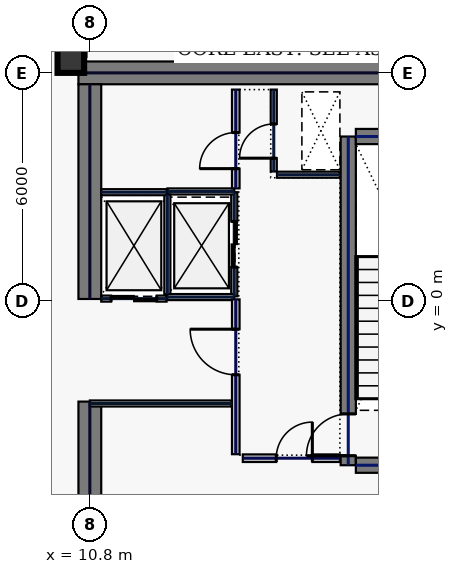
"""IFC4 building model, lengths in metres.
Left out: names, types, materials, properties, quantities, classifications, styles, units other than length and angle.
Written with IfcOpenShell. Run it as: python <this file> out.ifc"""

import sys

from ifc_helpers import new_model, si_unit, direction, frame, frame_2d, origin, origin_2d, place, context, subcontext, project, spatial, rectangle, hollow_rectangle, extrude, element, fill, save


model = new_model("IFC4")
c1 = context("Model", 3, precision=1e-05, world=origin(), true_north=direction((0.0, 1.0)))
c2 = subcontext(c1, "Body", "Model", "MODEL_VIEW")
j1 = project(units=[si_unit("LENGTHUNIT", "METRE"), si_unit("PLANEANGLEUNIT", "RADIAN")], contexts=[c1])
p1 = place(None, origin())
s1 = spatial("IfcSite", under=j1, at=p1, CompositionType="ELEMENT")
p2 = place(p1, origin())
s2 = spatial("IfcBuilding", under=s1, at=p2, CompositionType="ELEMENT")
p3 = place(p2, frame((0.0, 0.0, 321.0)))
s3 = spatial("IfcBuildingStorey", under=s2, at=p3, CompositionType="ELEMENT", Elevation=321.0)
p4 = place(p3, frame((10.5, 6.0, 0.0), z_axis=(0.0, 0.0, 1.0), x_axis=(1.0, 0.0, 0.0)))
e1 = element("IfcWall", 1, at=p4, inside=s3, PredefinedType="SHEAR", context=c2, shape_type="SweptSolid", body=[
    extrude(rectangle(XDim=11.5, YDim=0.6, at=frame_2d((5.75, 0.0))), origin(), (0.0, 0.0, 1.0), 3.74),
])
p5 = place(p3, frame((10.8, -5.7, 0.0), z_axis=(0.0, 0.0, 1.0), x_axis=(0.0, 1.0, 0.0)))
e2 = element("IfcWall", 2, at=p5, inside=s3, PredefinedType="SHEAR", context=c2, shape_type="SweptSolid", body=[
    extrude(rectangle(XDim=3.05, YDim=0.6, at=frame_2d((1.525, 0.0))), origin(), (0.0, 0.0, 1.0), 3.74),
])
p6 = place(p3, frame((10.8, 0.05, 0.0), z_axis=(0.0, 0.0, 1.0), x_axis=(0.0, 1.0, 0.0)))
e3 = element("IfcWall", 3, at=p6, inside=s3, PredefinedType="SHEAR", context=c2, shape_type="SweptSolid", body=[
    extrude(rectangle(XDim=5.65, YDim=0.6, at=frame_2d((2.825, 0.0))), origin(), (0.0, 0.0, 1.0), 3.74),
])
p7 = place(p3, frame((17.6, -4.325, 0.0), z_axis=(0.0, 0.0, 1.0), x_axis=(0.0, 1.0, 0.0)))
e4 = element("IfcWall", 4, at=p7, inside=s3, PredefinedType="SHEAR", context=c2, shape_type="SweptSolid", body=[
    extrude(rectangle(XDim=8.65, YDim=0.4, at=frame_2d((4.325, 0.0))), origin(), (0.0, 0.0, 1.0), 3.74),
])
p8 = place(p7, frame((0.25, 0.0, 0.0)))
e5 = element("IfcOpeningElement", 5, at=p8, cuts=e4, PredefinedType="OPENING", context=c2, shape_type="SweptSolid", body=[
    extrude(rectangle(XDim=1.1, YDim=2.2, at=frame_2d((0.55, 1.1))), frame((0.0, 0.21, 0.0), z_axis=(0.0, -1.0, 0.0), x_axis=(1.0, 0.0, 0.0)), (0.0, 0.0, 1.0), 0.42),
])
for number, where, z_axis, x_axis in (
    (6, (17.8, -4.325, 0.0), (0.0, 0.0, 1.0), (1.0, 0.0, 0.0)),
    (7, (17.8, 4.325, 0.0), (0.0, 0.0, 1.0), (1.0, 0.0, 0.0)),
):
    element("IfcWall", number, at=place(p3, frame(where, z_axis=z_axis, x_axis=x_axis)), inside=s3, PredefinedType="SHEAR", context=c2, shape_type="SweptSolid", body=[
        extrude(rectangle(XDim=3.4, YDim=0.4, at=frame_2d((1.7, 0.0))), origin(), (0.0, 0.0, 1.0), 3.74),
    ])
p9 = place(p3, frame((10.3, 6.35, 0.0), z_axis=(0.0, 0.0, 1.0), x_axis=(1.0, 0.0, 0.0)))
e8 = element("IfcColumn", 8, at=p9, inside=s3, PredefinedType="COLUMN", context=c2, shape_type="SweptSolid", body=[
    extrude(hollow_rectangle(XDim=0.7, YDim=0.7, WallThickness=0.032, at=origin_2d()), origin(), (0.0, 0.0, 1.0), 3.74),
])
p10 = place(p3, frame((14.6, 0.12, 0.0), z_axis=(0.0, 0.0, 1.0), x_axis=(0.0, 1.0, 0.0)))
e9 = element("IfcWall", 9, at=p10, inside=s3, PredefinedType="PARTITIONING", context=c2, shape_type="SweptSolid", body=[
    extrude(rectangle(XDim=2.74, YDim=0.16, at=frame_2d((1.37, 0.0))), origin(), (0.0, 0.0, 1.0), 3.74),
])
p11 = place(p10, frame((0.77, 0.0, 0.0)))
e10 = element("IfcOpeningElement", 10, at=p11, cuts=e9, PredefinedType="OPENING", context=c2, shape_type="SweptSolid", body=[
    extrude(rectangle(XDim=1.2, YDim=2.2, at=frame_2d((0.6, 1.1))), frame((0.0, 0.09, 0.0), z_axis=(0.0, -1.0, 0.0), x_axis=(1.0, 0.0, 0.0)), (0.0, 0.0, 1.0), 0.18),
])
for number, where, z_axis, x_axis in (
    (11, (12.84, 0.1, 0.0), (0.0, 0.0, 1.0), (1.0, 0.0, 0.0)),
    (12, (12.84, 2.88, 0.0), (0.0, 0.0, 1.0), (1.0, 0.0, 0.0)),
):
    element("IfcWall", number, at=place(p3, frame(where, z_axis=z_axis, x_axis=x_axis)), inside=s3, PredefinedType="PARTITIONING", context=c2, shape_type="SweptSolid", body=[
        extrude(rectangle(XDim=1.76, YDim=0.16, at=frame_2d((0.88, 0.0))), origin(), (0.0, 0.0, 1.0), 3.74),
    ])
p12 = place(p3, frame((12.84, 0.18, 0.0), z_axis=(0.0, 0.0, 1.0), x_axis=(0.0, 1.0, 0.0)))
e13 = element("IfcWall", 13, at=p12, inside=s3, PredefinedType="PARTITIONING", context=c2, shape_type="SweptSolid", body=[
    extrude(rectangle(XDim=2.62, YDim=0.16, at=frame_2d((1.31, 0.0))), origin(), (0.0, 0.0, 1.0), 3.74),
])
p13 = place(p3, frame((11.1, 0.06, 0.0), z_axis=(0.0, 0.0, 1.0), x_axis=(1.0, 0.0, 0.0)))
e14 = element("IfcWall", 14, at=p13, inside=s3, PredefinedType="PARTITIONING", context=c2, shape_type="SweptSolid", body=[
    extrude(rectangle(XDim=1.72, YDim=0.16, at=frame_2d((0.86, 0.0))), origin(), (0.0, 0.0, 1.0), 3.74),
])
p14 = place(p13, frame((0.26, 0.0, 0.0)))
e15 = element("IfcOpeningElement", 15, at=p14, cuts=e14, PredefinedType="OPENING", context=c2, shape_type="SweptSolid", body=[
    extrude(rectangle(XDim=1.2, YDim=2.2, at=frame_2d((0.6, 1.1))), frame((0.0, 0.09, 0.0), z_axis=(0.0, -1.0, 0.0), x_axis=(1.0, 0.0, 0.0)), (0.0, 0.0, 1.0), 0.18),
])
p15 = place(p3, frame((11.1, 2.86, 0.0), z_axis=(0.0, 0.0, 1.0), x_axis=(1.0, 0.0, 0.0)))
e16 = element("IfcWall", 16, at=p15, inside=s3, PredefinedType="PARTITIONING", context=c2, shape_type="SweptSolid", body=[
    extrude(rectangle(XDim=1.72, YDim=0.16, at=frame_2d((0.86, 0.0))), origin(), (0.0, 0.0, 1.0), 3.74),
])
p16 = place(p3, frame((15.64, 3.405, 0.0), z_axis=(0.0, 0.0, 1.0), x_axis=(0.0, 1.0, 0.0)))
e17 = element("IfcWall", 17, at=p16, inside=s3, PredefinedType="PARTITIONING", context=c2, shape_type="SweptSolid", body=[
    extrude(rectangle(XDim=2.155, YDim=0.16, at=frame_2d((1.078, 0.0))), origin(), (0.0, 0.0, 1.0), 3.74),
])
p17 = place(p16, frame((0.35, 0.0, 0.0)))
e18 = element("IfcOpeningElement", 18, at=p17, cuts=e17, PredefinedType="OPENING", context=c2, shape_type="SweptSolid", body=[
    extrude(rectangle(XDim=0.9, YDim=2.2, at=frame_2d((0.45, 1.1))), frame((0.0, 0.09, 0.0), z_axis=(0.0, -1.0, 0.0), x_axis=(1.0, 0.0, 0.0)), (0.0, 0.0, 1.0), 0.18),
])
p18 = place(p3, frame((15.725, 3.32, 0.0), z_axis=(0.0, 0.0, 1.0), x_axis=(1.0, 0.0, 0.0)))
e19 = element("IfcWall", 19, at=p18, inside=s3, PredefinedType="PARTITIONING", context=c2, shape_type="SweptSolid", body=[
    extrude(rectangle(XDim=1.655, YDim=0.16, at=frame_2d((0.827, 0.0))), origin(), (0.0, 0.0, 1.0), 3.74),
])
p19 = place(p3, frame((14.825, -4.14, 0.0), z_axis=(0.0, 0.0, 1.0), x_axis=(1.0, 0.0, 0.0)))
e20 = element("IfcWall", 20, at=p19, inside=s3, PredefinedType="SOLIDWALL", context=c2, shape_type="SweptSolid", body=[
    extrude(rectangle(XDim=2.555, YDim=0.2, at=frame_2d((1.277, 0.0))), origin(), (0.0, 0.0, 1.0), 3.74),
])
p20 = place(p19, frame((0.88, 0.0, 0.0)))
e21 = element("IfcOpeningElement", 21, at=p20, cuts=e20, PredefinedType="OPENING", context=c2, shape_type="SweptSolid", body=[
    extrude(rectangle(XDim=0.95, YDim=2.2, at=frame_2d((0.475, 1.1))), frame((0.0, 0.11, 0.0), z_axis=(0.0, -1.0, 0.0), x_axis=(1.0, 0.0, 0.0)), (0.0, 0.0, 1.0), 0.22),
])
p21 = place(p3, frame((10.8, -2.7, 0.0), z_axis=(0.0, 0.0, 1.0), x_axis=(1.0, 0.0, 0.0)))
e22 = element("IfcWall", 22, at=p21, inside=s3, PredefinedType="PARTITIONING", context=c2, shape_type="SweptSolid", body=[
    extrude(rectangle(XDim=3.735, YDim=0.16, at=frame_2d((1.867, 0.0))), origin(), (0.0, 0.0, 1.0), 3.74),
])
p22 = place(p3, frame((14.64, 2.96, 0.0), z_axis=(0.0, 0.0, 1.0), x_axis=(0.0, 1.0, 0.0)))
e23 = element("IfcWall", 23, at=p22, inside=s3, PredefinedType="SOLIDWALL", context=c2, shape_type="SweptSolid", body=[
    extrude(rectangle(XDim=2.6, YDim=0.2, at=frame_2d((1.3, 0.0))), origin(), (0.0, 0.0, 1.0), 3.74),
])
p23 = place(p22, frame((0.52, 0.0, 0.0)))
e24 = element("IfcOpeningElement", 24, at=p23, cuts=e23, PredefinedType="OPENING", context=c2, shape_type="SweptSolid", body=[
    extrude(rectangle(XDim=0.95, YDim=2.2, at=frame_2d((0.475, 1.1))), frame((0.0, 0.11, 0.0), z_axis=(0.0, -1.0, 0.0), x_axis=(1.0, 0.0, 0.0)), (0.0, 0.0, 1.0), 0.22),
])
p24 = place(p3, frame((14.64, -4.035, 0.0), z_axis=(0.0, 0.0, 1.0), x_axis=(0.0, 1.0, 0.0)))
e25 = element("IfcWall", 25, at=p24, inside=s3, PredefinedType="SOLIDWALL", context=c2, shape_type="SweptSolid", body=[
    extrude(rectangle(XDim=4.075, YDim=0.2, at=frame_2d((2.038, 0.0))), origin(), (0.0, 0.0, 1.0), 3.74),
])
p25 = place(p24, frame((2.09, 0.0, 0.0)))
e26 = element("IfcOpeningElement", 26, at=p25, cuts=e25, PredefinedType="OPENING", context=c2, shape_type="SweptSolid", body=[
    extrude(rectangle(XDim=1.2, YDim=2.2, at=frame_2d((0.6, 1.1))), frame((0.0, 0.11, 0.0), z_axis=(0.0, -1.0, 0.0), x_axis=(1.0, 0.0, 0.0)), (0.0, 0.0, 1.0), 0.22),
])
p26 = place(p3, frame((10.63, 7.185, 0.0), z_axis=(0.0, 0.0, 1.0), x_axis=(0.0, -1.0, 0.0)))
e27 = element("IfcWall", 27, at=p26, inside=s3, PredefinedType="PARTITIONING", context=c2, shape_type="SweptSolid", body=[
    extrude(rectangle(XDim=0.765, YDim=0.16, at=frame_2d((0.383, 0.0))), origin(), (0.0, 0.0, 1.0), 3.74),
])
p27 = place(p8, origin())
e28 = element("IfcDoor", 28, at=p27, inside=s3, OperationType="SINGLE_SWING_LEFT", PredefinedType="DOOR", context=c2, shape_type="SweptSolid", body=[
    extrude(rectangle(XDim=1.1, YDim=2.2, at=frame_2d((0.55, 1.1))), frame((0.0, 0.025, 0.0), z_axis=(0.0, -1.0, 0.0), x_axis=(1.0, 0.0, 0.0)), (0.0, 0.0, 1.0), 0.05),
])
fill(e5, e28)
p28 = place(p11, origin())
e29 = element("IfcDoor", 29, at=p28, inside=s3, OperationType="SLIDING_TO_LEFT", PredefinedType="DOOR", context=c2, shape_type="SweptSolid", body=[
    extrude(rectangle(XDim=1.2, YDim=2.2, at=frame_2d((0.6, 1.1))), frame((0.0, 0.025, 0.0), z_axis=(0.0, -1.0, 0.0), x_axis=(1.0, 0.0, 0.0)), (0.0, 0.0, 1.0), 0.05),
])
fill(e10, e29)
p29 = place(p14, origin())
e30 = element("IfcDoor", 30, at=p29, inside=s3, OperationType="SLIDING_TO_LEFT", PredefinedType="DOOR", context=c2, shape_type="SweptSolid", body=[
    extrude(rectangle(XDim=1.2, YDim=2.2, at=frame_2d((0.6, 1.1))), frame((0.0, 0.025, 0.0), z_axis=(0.0, -1.0, 0.0), x_axis=(1.0, 0.0, 0.0)), (0.0, 0.0, 1.0), 0.05),
])
fill(e15, e30)
p30 = place(p17, origin())
e31 = element("IfcDoor", 31, at=p30, inside=s3, OperationType="SINGLE_SWING_LEFT", PredefinedType="DOOR", context=c2, shape_type="SweptSolid", body=[
    extrude(rectangle(XDim=0.9, YDim=2.2, at=frame_2d((0.45, 1.1))), frame((0.0, 0.025, 0.0), z_axis=(0.0, -1.0, 0.0), x_axis=(1.0, 0.0, 0.0)), (0.0, 0.0, 1.0), 0.05),
])
fill(e18, e31)
p31 = place(p20, origin())
e32 = element("IfcDoor", 32, at=p31, inside=s3, OperationType="SINGLE_SWING_RIGHT", PredefinedType="DOOR", context=c2, shape_type="SweptSolid", body=[
    extrude(rectangle(XDim=0.95, YDim=2.2, at=frame_2d((0.475, 1.1))), frame((0.0, 0.025, 0.0), z_axis=(0.0, -1.0, 0.0), x_axis=(1.0, 0.0, 0.0)), (0.0, 0.0, 1.0), 0.05),
])
fill(e21, e32)
p32 = place(p23, origin())
e33 = element("IfcDoor", 33, at=p32, inside=s3, OperationType="SINGLE_SWING_LEFT", PredefinedType="DOOR", context=c2, shape_type="SweptSolid", body=[
    extrude(rectangle(XDim=0.95, YDim=2.2, at=frame_2d((0.475, 1.1))), frame((0.0, 0.025, 0.0), z_axis=(0.0, -1.0, 0.0), x_axis=(1.0, 0.0, 0.0)), (0.0, 0.0, 1.0), 0.05),
])
fill(e24, e33)
p33 = place(p25, origin())
e34 = element("IfcDoor", 34, at=p33, inside=s3, OperationType="SINGLE_SWING_RIGHT", PredefinedType="DOOR", context=c2, shape_type="SweptSolid", body=[
    extrude(rectangle(XDim=1.2, YDim=2.2, at=frame_2d((0.6, 1.1))), frame((0.0, 0.025, 0.0), z_axis=(0.0, -1.0, 0.0), x_axis=(1.0, 0.0, 0.0)), (0.0, 0.0, 1.0), 0.05),
])
fill(e26, e34)
save(model, sys.argv[1])
